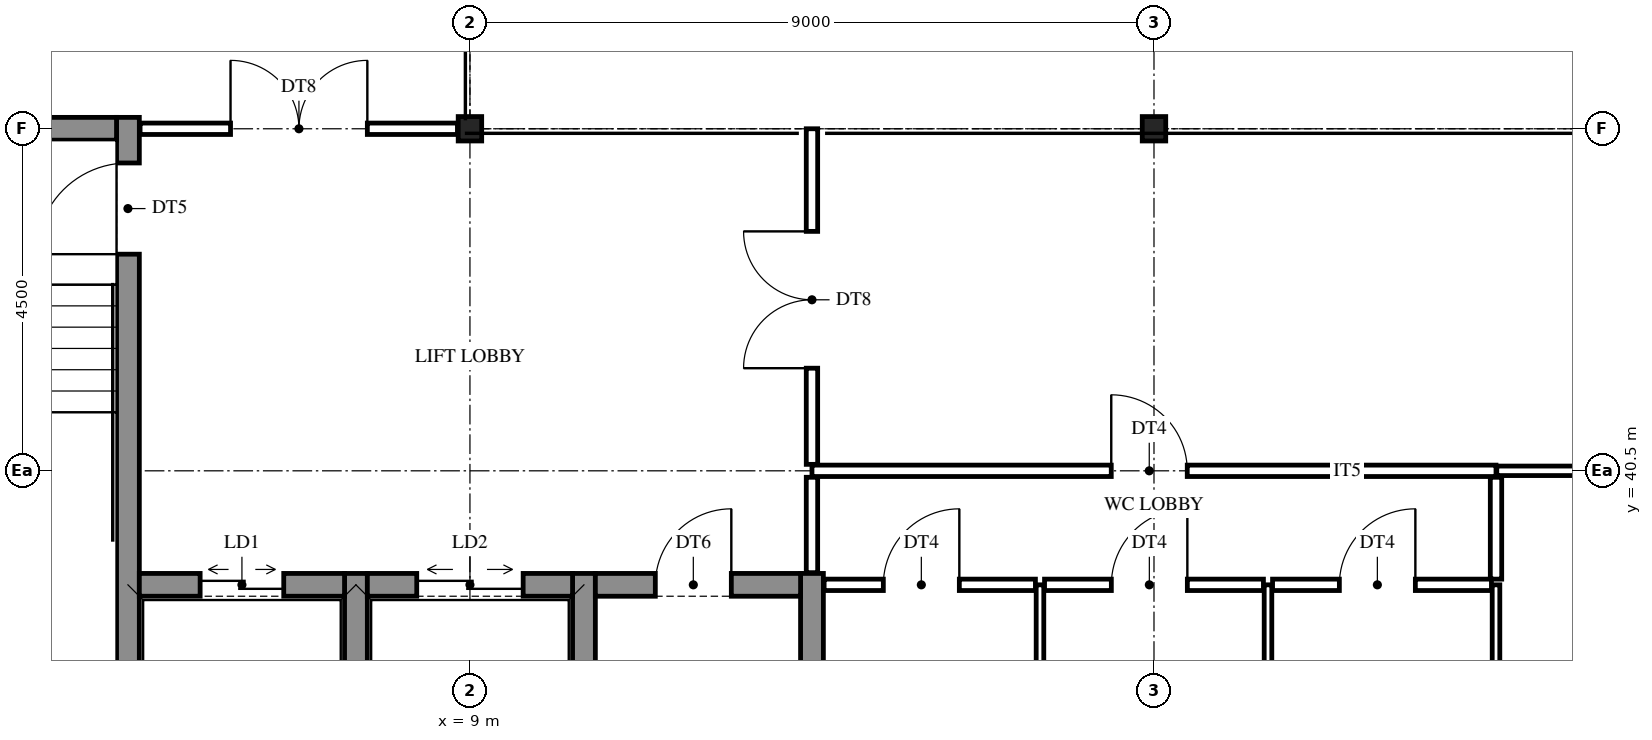
"""IFC4 building model, lengths in metres.
Left out: names, types, materials, properties, quantities, classifications, styles, units other than length and angle.
Written with IfcOpenShell. Run it as: python <this file> out.ifc"""

import sys

from ifc_helpers import new_model, si_unit, direction, frame, frame_2d, origin, origin_2d, place, context, subcontext, project, spatial, rectangle, i_section, extrude, element, fill, save


model = new_model("IFC4")
c1 = context("Model", 3, precision=1e-05, world=origin(), true_north=direction((0.0, 1.0)))
c2 = subcontext(c1, "Body", "Model", "MODEL_VIEW")
j1 = project(units=[si_unit("LENGTHUNIT", "METRE"), si_unit("PLANEANGLEUNIT", "RADIAN")], contexts=[c1])
p1 = place(None, origin())
s1 = spatial("IfcSite", under=j1, at=p1, CompositionType="ELEMENT")
p2 = place(p1, origin())
s2 = spatial("IfcBuilding", under=s1, at=p2, CompositionType="ELEMENT")
p3 = place(p2, frame((0.0, 0.0, 6.0)))
s3 = spatial("IfcBuildingStorey", under=s2, at=p3, CompositionType="ELEMENT", Elevation=6.0)
for number, where, z_axis, x_axis in (
    (1, (9.0, 45.0, 0.0), (0.0, 0.0, 1.0), (1.0, 0.0, 0.0)),
    (2, (18.0, 45.0, 0.0), (0.0, 0.0, 1.0), (1.0, 0.0, 0.0)),
):
    element("IfcColumn", number, at=place(p3, frame(where, z_axis=z_axis, x_axis=x_axis)), inside=s3, PredefinedType="COLUMN", context=c2, shape_type="SweptSolid", body=[
        extrude(i_section(OverallWidth=0.309, OverallDepth=0.321, WebThickness=0.014, FlangeThickness=0.022, FilletRadius=0.017, at=origin_2d()), origin(), (0.0, 0.0, 1.0), 4.5),
    ])
p4 = place(p3, frame((4.5, 35.85, 0.0), z_axis=(0.0, 0.0, 1.0), x_axis=(0.0, 1.0, 0.0)))
e3 = element("IfcWall", 3, at=p4, inside=s3, PredefinedType="SHEAR", context=c2, shape_type="SweptSolid", body=[
    extrude(rectangle(XDim=9.3, YDim=0.3, at=frame_2d((4.65, 0.0))), origin(), (0.0, 0.0, 1.0), 4.5),
])
p5 = place(p4, frame((7.5, 0.0, 0.0)))
e4 = element("IfcOpeningElement", 4, at=p5, cuts=e3, PredefinedType="OPENING", context=c2, shape_type="SweptSolid", body=[
    extrude(rectangle(XDim=1.2, YDim=2.1, at=frame_2d((0.6, 1.05))), frame((0.0, 0.16, 0.0), z_axis=(0.0, -1.0, 0.0), x_axis=(1.0, 0.0, 0.0)), (0.0, 0.0, 1.0), 0.32),
])
for number, where, z_axis, x_axis in (
    (5, (7.5, 35.85, 0.0), (0.0, 0.0, 1.0), (0.0, 1.0, 0.0)),
    (6, (10.5, 35.85, 0.0), (0.0, 0.0, 1.0), (0.0, 1.0, 0.0)),
    (7, (13.5, 35.85, 0.0), (0.0, 0.0, 1.0), (0.0, 1.0, 0.0)),
):
    element("IfcWall", number, at=place(p3, frame(where, z_axis=z_axis, x_axis=x_axis)), inside=s3, PredefinedType="SHEAR", context=c2, shape_type="SweptSolid", body=[
        extrude(rectangle(XDim=3.3, YDim=0.3, at=frame_2d((1.65, 0.0))), origin(), (0.0, 0.0, 1.0), 4.5),
    ])
p6 = place(p3, frame((4.65, 39.0, 0.0), z_axis=(0.0, 0.0, 1.0), x_axis=(1.0, 0.0, 0.0)))
e8 = element("IfcWall", 8, at=p6, inside=s3, PredefinedType="SHEAR", context=c2, shape_type="SweptSolid", body=[
    extrude(rectangle(XDim=2.7, YDim=0.3, at=frame_2d((1.35, 0.0))), origin(), (0.0, 0.0, 1.0), 4.5),
])
p7 = place(p6, frame((0.8, 0.0, 0.0)))
e9 = element("IfcOpeningElement", 9, at=p7, cuts=e8, PredefinedType="OPENING", context=c2, shape_type="SweptSolid", body=[
    extrude(rectangle(XDim=1.1, YDim=2.1, at=frame_2d((0.55, 1.05))), frame((0.0, 0.16, 0.0), z_axis=(0.0, -1.0, 0.0), x_axis=(1.0, 0.0, 0.0)), (0.0, 0.0, 1.0), 0.32),
])
p8 = place(p3, frame((7.65, 39.0, 0.0), z_axis=(0.0, 0.0, 1.0), x_axis=(1.0, 0.0, 0.0)))
e10 = element("IfcWall", 10, at=p8, inside=s3, PredefinedType="SHEAR", context=c2, shape_type="SweptSolid", body=[
    extrude(rectangle(XDim=2.7, YDim=0.3, at=frame_2d((1.35, 0.0))), origin(), (0.0, 0.0, 1.0), 4.5),
])
p9 = place(p8, frame((0.65, 0.0, 0.0)))
e11 = element("IfcOpeningElement", 11, at=p9, cuts=e10, PredefinedType="OPENING", context=c2, shape_type="SweptSolid", body=[
    extrude(rectangle(XDim=1.4, YDim=2.1, at=frame_2d((0.7, 1.05))), frame((0.0, 0.16, 0.0), z_axis=(0.0, -1.0, 0.0), x_axis=(1.0, 0.0, 0.0)), (0.0, 0.0, 1.0), 0.32),
])
p10 = place(p3, frame((10.65, 39.0, 0.0), z_axis=(0.0, 0.0, 1.0), x_axis=(1.0, 0.0, 0.0)))
e12 = element("IfcWall", 12, at=p10, inside=s3, PredefinedType="SHEAR", context=c2, shape_type="SweptSolid", body=[
    extrude(rectangle(XDim=2.7, YDim=0.3, at=frame_2d((1.35, 0.0))), origin(), (0.0, 0.0, 1.0), 4.5),
])
p11 = place(p10, frame((0.789, 0.0, 0.0)))
e13 = element("IfcOpeningElement", 13, at=p11, cuts=e12, PredefinedType="OPENING", context=c2, shape_type="SweptSolid", body=[
    extrude(rectangle(XDim=1.0, YDim=2.1, at=frame_2d((0.5, 1.05))), frame((0.0, 0.16, 0.0), z_axis=(0.0, -1.0, 0.0), x_axis=(1.0, 0.0, 0.0)), (0.0, 0.0, 1.0), 0.32),
])
p12 = place(p3, frame((0.15, 45.0, 0.0), z_axis=(0.0, 0.0, 1.0), x_axis=(1.0, 0.0, 0.0)))
e14 = element("IfcWall", 14, at=p12, inside=s3, PredefinedType="SHEAR", context=c2, shape_type="SweptSolid", body=[
    extrude(rectangle(XDim=4.2, YDim=0.3, at=frame_2d((2.1, 0.0))), origin(), (0.0, 0.0, 1.0), 4.5),
])
p13 = place(p3, frame((13.5, 39.16, 0.0), z_axis=(0.0, 0.0, 1.0), x_axis=(0.0, 1.0, 0.0)))
e15 = element("IfcWall", 15, at=p13, inside=s3, PredefinedType="PARTITIONING", context=c2, shape_type="SweptSolid", body=[
    extrude(rectangle(XDim=1.255, YDim=0.15, at=frame_2d((0.627, 0.0))), origin(), (0.0, 0.0, 1.0), 3.718),
])
p14 = place(p3, frame((13.5, 40.585, 0.0), z_axis=(0.0, 0.0, 1.0), x_axis=(0.0, 1.0, 0.0)))
e16 = element("IfcWall", 16, at=p14, inside=s3, PredefinedType="PARTITIONING", context=c2, shape_type="SweptSolid", body=[
    extrude(rectangle(XDim=4.415, YDim=0.15, at=frame_2d((2.208, 0.0))), origin(), (0.0, 0.0, 1.0), 3.718),
])
p15 = place(p14, frame((1.265, 0.0, 0.0)))
e17 = element("IfcOpeningElement", 17, at=p15, cuts=e16, PredefinedType="OPENING", context=c2, shape_type="SweptSolid", body=[
    extrude(rectangle(XDim=1.8, YDim=2.1, at=frame_2d((0.9, 1.05))), frame((0.0, 0.085, 0.0), z_axis=(0.0, -1.0, 0.0), x_axis=(1.0, 0.0, 0.0)), (0.0, 0.0, 1.0), 0.17),
])
for number, where, z_axis, x_axis in (
    (18, (16.5, 35.85, 0.0), (0.0, 0.0, 1.0), (0.0, 1.0, 0.0)),
    (19, (19.5, 35.85, 0.0), (0.0, 0.0, 1.0), (0.0, 1.0, 0.0)),
    (20, (22.5, 35.85, 0.0), (0.0, 0.0, 1.0), (0.0, 1.0, 0.0)),
):
    element("IfcWall", number, at=place(p3, frame(where, z_axis=z_axis, x_axis=x_axis)), inside=s3, PredefinedType="PARTITIONING", context=c2, shape_type="SweptSolid", body=[
        extrude(rectangle(XDim=3.15, YDim=0.1, at=frame_2d((1.575, 0.0))), origin(), (0.0, 0.0, 1.0), 3.718),
    ])
p16 = place(p3, frame((22.5, 39.075, 0.0), z_axis=(0.0, 0.0, 1.0), x_axis=(0.0, 1.0, 0.0)))
e21 = element("IfcWall", 21, at=p16, inside=s3, PredefinedType="PARTITIONING", context=c2, shape_type="SweptSolid", body=[
    extrude(rectangle(XDim=1.34, YDim=0.15, at=frame_2d((0.67, 0.0))), origin(), (0.0, 0.0, 1.0), 3.718),
])
p17 = place(p3, frame((13.66, 39.0, 0.0), z_axis=(0.0, 0.0, 1.0), x_axis=(1.0, 0.0, 0.0)))
e22 = element("IfcWall", 22, at=p17, inside=s3, PredefinedType="PARTITIONING", context=c2, shape_type="SweptSolid", body=[
    extrude(rectangle(XDim=2.78, YDim=0.15, at=frame_2d((1.39, 0.0))), origin(), (0.0, 0.0, 1.0), 3.718),
])
p18 = place(p17, frame((0.779, 0.0, 0.0)))
e23 = element("IfcOpeningElement", 23, at=p18, cuts=e22, PredefinedType="OPENING", context=c2, shape_type="SweptSolid", body=[
    extrude(rectangle(XDim=1.0, YDim=2.1, at=frame_2d((0.5, 1.05))), frame((0.0, 0.085, 0.0), z_axis=(0.0, -1.0, 0.0), x_axis=(1.0, 0.0, 0.0)), (0.0, 0.0, 1.0), 0.17),
])
p19 = place(p3, frame((16.56, 39.0, 0.0), z_axis=(0.0, 0.0, 1.0), x_axis=(1.0, 0.0, 0.0)))
e24 = element("IfcWall", 24, at=p19, inside=s3, PredefinedType="PARTITIONING", context=c2, shape_type="SweptSolid", body=[
    extrude(rectangle(XDim=2.88, YDim=0.15, at=frame_2d((1.44, 0.0))), origin(), (0.0, 0.0, 1.0), 3.718),
])
p20 = place(p19, frame((0.879, 0.0, 0.0)))
e25 = element("IfcOpeningElement", 25, at=p20, cuts=e24, PredefinedType="OPENING", context=c2, shape_type="SweptSolid", body=[
    extrude(rectangle(XDim=1.0, YDim=2.1, at=frame_2d((0.5, 1.05))), frame((0.0, 0.085, 0.0), z_axis=(0.0, -1.0, 0.0), x_axis=(1.0, 0.0, 0.0)), (0.0, 0.0, 1.0), 0.17),
])
p21 = place(p3, frame((19.56, 39.0, 0.0), z_axis=(0.0, 0.0, 1.0), x_axis=(1.0, 0.0, 0.0)))
e26 = element("IfcWall", 26, at=p21, inside=s3, PredefinedType="PARTITIONING", context=c2, shape_type="SweptSolid", body=[
    extrude(rectangle(XDim=2.88, YDim=0.15, at=frame_2d((1.44, 0.0))), origin(), (0.0, 0.0, 1.0), 3.718),
])
p22 = place(p21, frame((0.879, 0.0, 0.0)))
e27 = element("IfcOpeningElement", 27, at=p22, cuts=e26, PredefinedType="OPENING", context=c2, shape_type="SweptSolid", body=[
    extrude(rectangle(XDim=1.0, YDim=2.1, at=frame_2d((0.5, 1.05))), frame((0.0, 0.085, 0.0), z_axis=(0.0, -1.0, 0.0), x_axis=(1.0, 0.0, 0.0)), (0.0, 0.0, 1.0), 0.17),
])
p23 = place(p3, frame((13.5, 40.5, 0.0), z_axis=(0.0, 0.0, 1.0), x_axis=(1.0, 0.0, 0.0)))
e28 = element("IfcWall", 28, at=p23, inside=s3, PredefinedType="PARTITIONING", context=c2, shape_type="SweptSolid", body=[
    extrude(rectangle(XDim=9.0, YDim=0.15, at=frame_2d((4.5, 0.0))), origin(), (0.0, 0.0, 1.0), 3.718),
])
p24 = place(p23, frame((3.938, 0.0, 0.0)))
e29 = element("IfcOpeningElement", 29, at=p24, cuts=e28, PredefinedType="OPENING", context=c2, shape_type="SweptSolid", body=[
    extrude(rectangle(XDim=1.0, YDim=2.1, at=frame_2d((0.5, 1.05))), frame((0.0, 0.085, 0.0), z_axis=(0.0, -1.0, 0.0), x_axis=(1.0, 0.0, 0.0)), (0.0, 0.0, 1.0), 0.17),
])
p25 = place(p3, frame((22.51, 40.5, 0.0), z_axis=(0.0, 0.0, 1.0), x_axis=(1.0, 0.0, 0.0)))
e30 = element("IfcWall", 30, at=p25, inside=s3, PredefinedType="PARTITIONING", context=c2, shape_type="SweptSolid", body=[
    extrude(rectangle(XDim=4.417, YDim=0.125, at=frame_2d((2.209, 0.0))), origin(), (0.0, 0.0, 1.0), 3.718),
])
p26 = place(p3, frame((4.66, 45.0, 0.0), z_axis=(0.0, 0.0, 1.0), x_axis=(1.0, 0.0, 0.0)))
e31 = element("IfcWall", 31, at=p26, inside=s3, PredefinedType="PARTITIONING", context=c2, shape_type="SweptSolid", body=[
    extrude(rectangle(XDim=4.176, YDim=0.15, at=frame_2d((2.088, 0.0))), origin(), (0.0, 0.0, 1.0), 3.718),
])
p27 = place(p26, frame((1.19, 0.0, 0.0)))
e32 = element("IfcOpeningElement", 32, at=p27, cuts=e31, PredefinedType="OPENING", context=c2, shape_type="SweptSolid", body=[
    extrude(rectangle(XDim=1.8, YDim=2.1, at=frame_2d((0.9, 1.05))), frame((0.0, 0.085, 0.0), z_axis=(0.0, -1.0, 0.0), x_axis=(1.0, 0.0, 0.0)), (0.0, 0.0, 1.0), 0.17),
])
p28 = place(p5, origin())
e33 = element("IfcDoor", 33, at=p28, inside=s3, OperationType="SINGLE_SWING_LEFT", PredefinedType="DOOR", context=c2, shape_type="SweptSolid", body=[
    extrude(rectangle(XDim=1.2, YDim=2.1, at=frame_2d((0.6, 1.05))), frame((0.0, 0.025, 0.0), z_axis=(0.0, -1.0, 0.0), x_axis=(1.0, 0.0, 0.0)), (0.0, 0.0, 1.0), 0.05),
])
fill(e4, e33)
p29 = place(p11, frame((1.0, 0.0, 0.0), z_axis=(0.0, 0.0, 1.0), x_axis=(-1.0, 0.0, 0.0)))
e34 = element("IfcDoor", 34, at=p29, inside=s3, OperationType="SINGLE_SWING_RIGHT", PredefinedType="DOOR", context=c2, shape_type="SweptSolid", body=[
    extrude(rectangle(XDim=1.0, YDim=2.1, at=frame_2d((0.5, 1.05))), frame((0.0, 0.025, 0.0), z_axis=(0.0, -1.0, 0.0), x_axis=(1.0, 0.0, 0.0)), (0.0, 0.0, 1.0), 0.05),
])
fill(e13, e34)
p30 = place(p15, frame((1.8, 0.0, 0.0), z_axis=(0.0, 0.0, 1.0), x_axis=(-1.0, 0.0, 0.0)))
e35 = element("IfcDoor", 35, at=p30, inside=s3, OperationType="DOUBLE_DOOR_SINGLE_SWING", PredefinedType="DOOR", context=c2, shape_type="SweptSolid", body=[
    extrude(rectangle(XDim=1.8, YDim=2.1, at=frame_2d((0.9, 1.05))), frame((0.0, 0.025, 0.0), z_axis=(0.0, -1.0, 0.0), x_axis=(1.0, 0.0, 0.0)), (0.0, 0.0, 1.0), 0.05),
])
fill(e17, e35)
p31 = place(p27, origin())
e36 = element("IfcDoor", 36, at=p31, inside=s3, OperationType="DOUBLE_DOOR_SINGLE_SWING", PredefinedType="DOOR", context=c2, shape_type="SweptSolid", body=[
    extrude(rectangle(XDim=1.8, YDim=2.1, at=frame_2d((0.9, 1.05))), frame((0.0, 0.025, 0.0), z_axis=(0.0, -1.0, 0.0), x_axis=(1.0, 0.0, 0.0)), (0.0, 0.0, 1.0), 0.05),
])
fill(e32, e36)
p32 = place(p18, frame((1.0, 0.0, 0.0), z_axis=(0.0, 0.0, 1.0), x_axis=(-1.0, 0.0, 0.0)))
e37 = element("IfcDoor", 37, at=p32, inside=s3, OperationType="SINGLE_SWING_RIGHT", PredefinedType="DOOR", context=c2, shape_type="SweptSolid", body=[
    extrude(rectangle(XDim=1.0, YDim=2.1, at=frame_2d((0.5, 1.05))), frame((0.0, 0.025, 0.0), z_axis=(0.0, -1.0, 0.0), x_axis=(1.0, 0.0, 0.0)), (0.0, 0.0, 1.0), 0.05),
])
fill(e23, e37)
p33 = place(p20, frame((1.0, 0.0, 0.0), z_axis=(0.0, 0.0, 1.0), x_axis=(-1.0, 0.0, 0.0)))
e38 = element("IfcDoor", 38, at=p33, inside=s3, OperationType="SINGLE_SWING_RIGHT", PredefinedType="DOOR", context=c2, shape_type="SweptSolid", body=[
    extrude(rectangle(XDim=1.0, YDim=2.1, at=frame_2d((0.5, 1.05))), frame((0.0, 0.025, 0.0), z_axis=(0.0, -1.0, 0.0), x_axis=(1.0, 0.0, 0.0)), (0.0, 0.0, 1.0), 0.05),
])
fill(e25, e38)
p34 = place(p22, frame((1.0, 0.0, 0.0), z_axis=(0.0, 0.0, 1.0), x_axis=(-1.0, 0.0, 0.0)))
e39 = element("IfcDoor", 39, at=p34, inside=s3, OperationType="SINGLE_SWING_RIGHT", PredefinedType="DOOR", context=c2, shape_type="SweptSolid", body=[
    extrude(rectangle(XDim=1.0, YDim=2.1, at=frame_2d((0.5, 1.05))), frame((0.0, 0.025, 0.0), z_axis=(0.0, -1.0, 0.0), x_axis=(1.0, 0.0, 0.0)), (0.0, 0.0, 1.0), 0.05),
])
fill(e27, e39)
p35 = place(p24, origin())
e40 = element("IfcDoor", 40, at=p35, inside=s3, OperationType="SINGLE_SWING_LEFT", PredefinedType="DOOR", context=c2, shape_type="SweptSolid", body=[
    extrude(rectangle(XDim=1.0, YDim=2.1, at=frame_2d((0.5, 1.05))), frame((0.0, 0.025, 0.0), z_axis=(0.0, -1.0, 0.0), x_axis=(1.0, 0.0, 0.0)), (0.0, 0.0, 1.0), 0.05),
])
fill(e29, e40)
p36 = place(p7, origin())
e41 = element("IfcDoor", 41, at=p36, inside=s3, OperationType="DOUBLE_DOOR_SLIDING", PredefinedType="DOOR", context=c2, shape_type="SweptSolid", body=[
    extrude(rectangle(XDim=1.1, YDim=2.1, at=frame_2d((0.55, 1.05))), frame((0.0, 0.025, 0.0), z_axis=(0.0, -1.0, 0.0), x_axis=(1.0, 0.0, 0.0)), (0.0, 0.0, 1.0), 0.05),
])
fill(e9, e41)
p37 = place(p9, origin())
e42 = element("IfcDoor", 42, at=p37, inside=s3, OperationType="DOUBLE_DOOR_SLIDING", PredefinedType="DOOR", context=c2, shape_type="SweptSolid", body=[
    extrude(rectangle(XDim=1.4, YDim=2.1, at=frame_2d((0.7, 1.05))), frame((0.0, 0.025, 0.0), z_axis=(0.0, -1.0, 0.0), x_axis=(1.0, 0.0, 0.0)), (0.0, 0.0, 1.0), 0.05),
])
fill(e11, e42)
save(model, sys.argv[1])
